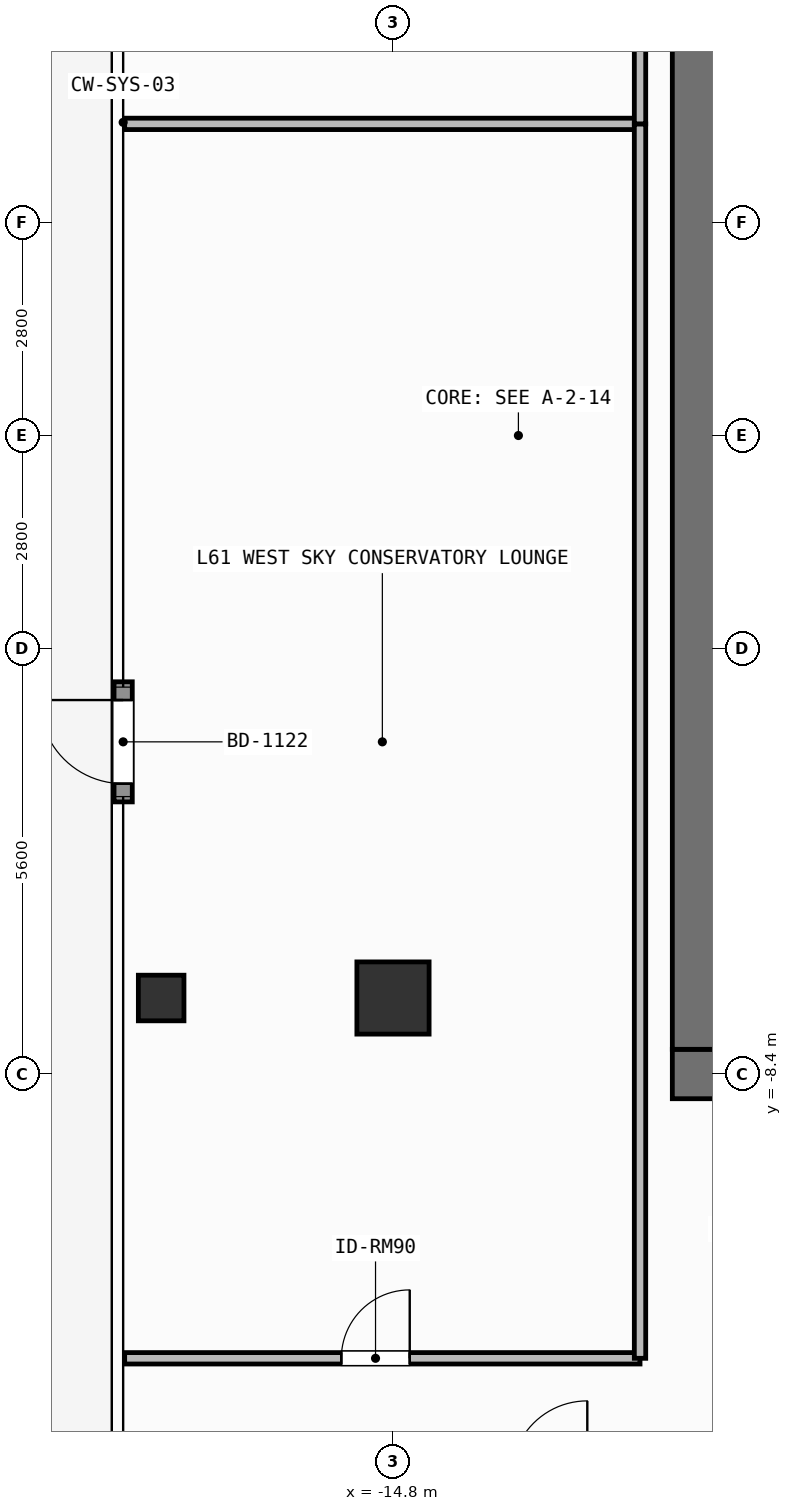
"""IFC4 building model, lengths in metres.
Left out: names, types, materials, properties, quantities, classifications, styles, units other than length and angle.
Written with IfcOpenShell. Run it as: python <this file> out.ifc"""

import sys

from ifc_helpers import new_model, si_unit, direction, frame, frame_2d, origin, origin_2d, place, context, subcontext, project, spatial, rectangle, hollow_rectangle, extrude, element, fill, save


model = new_model("IFC4")
c1 = context("Model", 3, precision=1e-05, world=origin(), true_north=direction((0.0, 1.0)))
c2 = subcontext(c1, "Body", "Model", "MODEL_VIEW")
j1 = project(units=[si_unit("LENGTHUNIT", "METRE"), si_unit("PLANEANGLEUNIT", "RADIAN")], contexts=[c1])
p1 = place(None, origin())
s1 = spatial("IfcSite", under=j1, at=p1, CompositionType="ELEMENT")
p2 = place(p1, origin())
s2 = spatial("IfcBuilding", under=s1, at=p2, CompositionType="ELEMENT")
p3 = place(p2, frame((0.0, 0.0, 250.8)))
s3 = spatial("IfcBuildingStorey", under=s2, at=p3, CompositionType="ELEMENT", Elevation=250.8)
p4 = place(p3, frame((-11.125, -8.4, 0.0), z_axis=(0.0, 0.0, 1.0), x_axis=(1.0, 0.0, 0.0)))
e1 = element("IfcWall", 1, at=p4, inside=s3, PredefinedType="SHEAR", context=c2, shape_type="SweptSolid", body=[
    extrude(rectangle(XDim=1.425, YDim=0.65, at=frame_2d((0.712, 0.0))), origin(), (0.0, 0.0, 1.0), 3.9),
])
p5 = place(p3, frame((-10.8, -8.075, 0.0), z_axis=(0.0, 0.0, 1.0), x_axis=(0.0, 1.0, 0.0)))
e2 = element("IfcWall", 2, at=p5, inside=s3, PredefinedType="SHEAR", context=c2, shape_type="SweptSolid", body=[
    extrude(rectangle(XDim=16.15, YDim=0.65, at=frame_2d((8.075, 0.0))), origin(), (0.0, 0.0, 1.0), 3.9),
])
p6 = place(p3, frame((-14.8, -7.4, 0.0), z_axis=(0.0, 0.0, 1.0), x_axis=(1.0, 0.0, 0.0)))
e3 = element("IfcColumn", 3, at=p6, inside=s3, PredefinedType="COLUMN", context=c2, shape_type="SweptSolid", body=[
    extrude(rectangle(XDim=0.95, YDim=0.95, at=origin_2d()), origin(), (0.0, 0.0, 1.0), 3.9),
])
p7 = place(p3, frame((-17.85, -7.4, 0.0), z_axis=(0.0, 0.0, 1.0), x_axis=(1.0, 0.0, 0.0)))
e4 = element("IfcColumn", 4, at=p7, inside=s3, PredefinedType="COLUMN", context=c2, shape_type="SweptSolid", body=[
    extrude(hollow_rectangle(XDim=0.6, YDim=0.6, WallThickness=0.028, at=origin_2d()), origin(), (0.0, 0.0, 1.0), 3.9),
])
p8 = place(p3, frame((-18.35, -4.82, 0.0), z_axis=(0.0, 0.0, 1.0), x_axis=(0.0, 1.0, 0.0)))
e5 = element("IfcWall", 5, at=p8, inside=s3, PredefinedType="SOLIDWALL", context=c2, shape_type="SweptSolid", body=[
    extrude(rectangle(XDim=1.58, YDim=0.24, at=frame_2d((0.79, 0.0))), origin(), (0.0, 0.0, 1.0), 3.62),
])
p9 = place(p8, frame((0.24, 0.0, 0.0)))
e6 = element("IfcOpeningElement", 6, at=p9, cuts=e5, PredefinedType="OPENING", context=c2, shape_type="SweptSolid", body=[
    extrude(rectangle(XDim=1.1, YDim=2.2, at=frame_2d((0.55, 1.1))), frame((0.0, 0.13, 0.0), z_axis=(0.0, -1.0, 0.0), x_axis=(1.0, 0.0, 0.0)), (0.0, 0.0, 1.0), 0.26),
])
p10 = place(p3, frame((-18.33, -12.14, 0.0), z_axis=(0.0, 0.0, 1.0), x_axis=(1.0, 0.0, 0.0)))
e7 = element("IfcWall", 7, at=p10, inside=s3, PredefinedType="PARTITIONING", context=c2, shape_type="SweptSolid", body=[
    extrude(rectangle(XDim=6.78, YDim=0.15, at=frame_2d((3.39, 0.0))), origin(), (0.0, 0.0, 1.0), 3.62),
])
p11 = place(p10, frame((2.85, 0.0, 0.0)))
e8 = element("IfcOpeningElement", 8, at=p11, cuts=e7, PredefinedType="OPENING", context=c2, shape_type="SweptSolid", body=[
    extrude(rectangle(XDim=0.9, YDim=2.1, at=frame_2d((0.45, 1.05))), frame((0.0, 0.085, 0.0), z_axis=(0.0, -1.0, 0.0), x_axis=(1.0, 0.0, 0.0)), (0.0, 0.0, 1.0), 0.17),
])
p12 = place(p3, frame((-18.33, 4.1, 0.0), z_axis=(0.0, 0.0, 1.0), x_axis=(1.0, 0.0, 0.0)))
e9 = element("IfcWall", 9, at=p12, inside=s3, PredefinedType="PARTITIONING", context=c2, shape_type="SweptSolid", body=[
    extrude(rectangle(XDim=6.78, YDim=0.15, at=frame_2d((3.39, 0.0))), origin(), (0.0, 0.0, 1.0), 3.62),
])
p13 = place(p3, frame((-11.55, -12.14, 0.0), z_axis=(0.0, 0.0, 1.0), x_axis=(0.0, 1.0, 0.0)))
e10 = element("IfcWall", 10, at=p13, inside=s3, PredefinedType="PARTITIONING", context=c2, shape_type="SweptSolid", body=[
    extrude(rectangle(XDim=16.24, YDim=0.15, at=frame_2d((8.12, 0.0))), origin(), (0.0, 0.0, 1.0), 3.62),
])
p14 = place(p3, frame((-11.55, 4.1, 0.0), z_axis=(0.0, 0.0, 1.0), x_axis=(0.0, 1.0, 0.0)))
e11 = element("IfcWall", 11, at=p14, inside=s3, PredefinedType="PARTITIONING", context=c2, shape_type="SweptSolid", body=[
    extrude(rectangle(XDim=8.04, YDim=0.15, at=frame_2d((4.02, 0.0))), origin(), (0.0, 0.0, 1.0), 3.62),
])
p15 = place(p9, origin())
e12 = element("IfcDoor", 12, at=p15, inside=s3, OperationType="SINGLE_SWING_RIGHT", PredefinedType="DOOR", context=c2, shape_type="SweptSolid", body=[
    extrude(rectangle(XDim=1.1, YDim=2.2, at=frame_2d((0.55, 1.1))), frame((0.0, 0.025, 0.0), z_axis=(0.0, -1.0, 0.0), x_axis=(1.0, 0.0, 0.0)), (0.0, 0.0, 1.0), 0.05),
])
fill(e6, e12)
p16 = place(p11, origin())
e13 = element("IfcDoor", 13, at=p16, inside=s3, OperationType="SINGLE_SWING_RIGHT", PredefinedType="DOOR", context=c2, shape_type="SweptSolid", body=[
    extrude(rectangle(XDim=0.9, YDim=2.1, at=frame_2d((0.45, 1.05))), frame((0.0, 0.025, 0.0), z_axis=(0.0, -1.0, 0.0), x_axis=(1.0, 0.0, 0.0)), (0.0, 0.0, 1.0), 0.05),
])
fill(e8, e13)
save(model, sys.argv[1])
